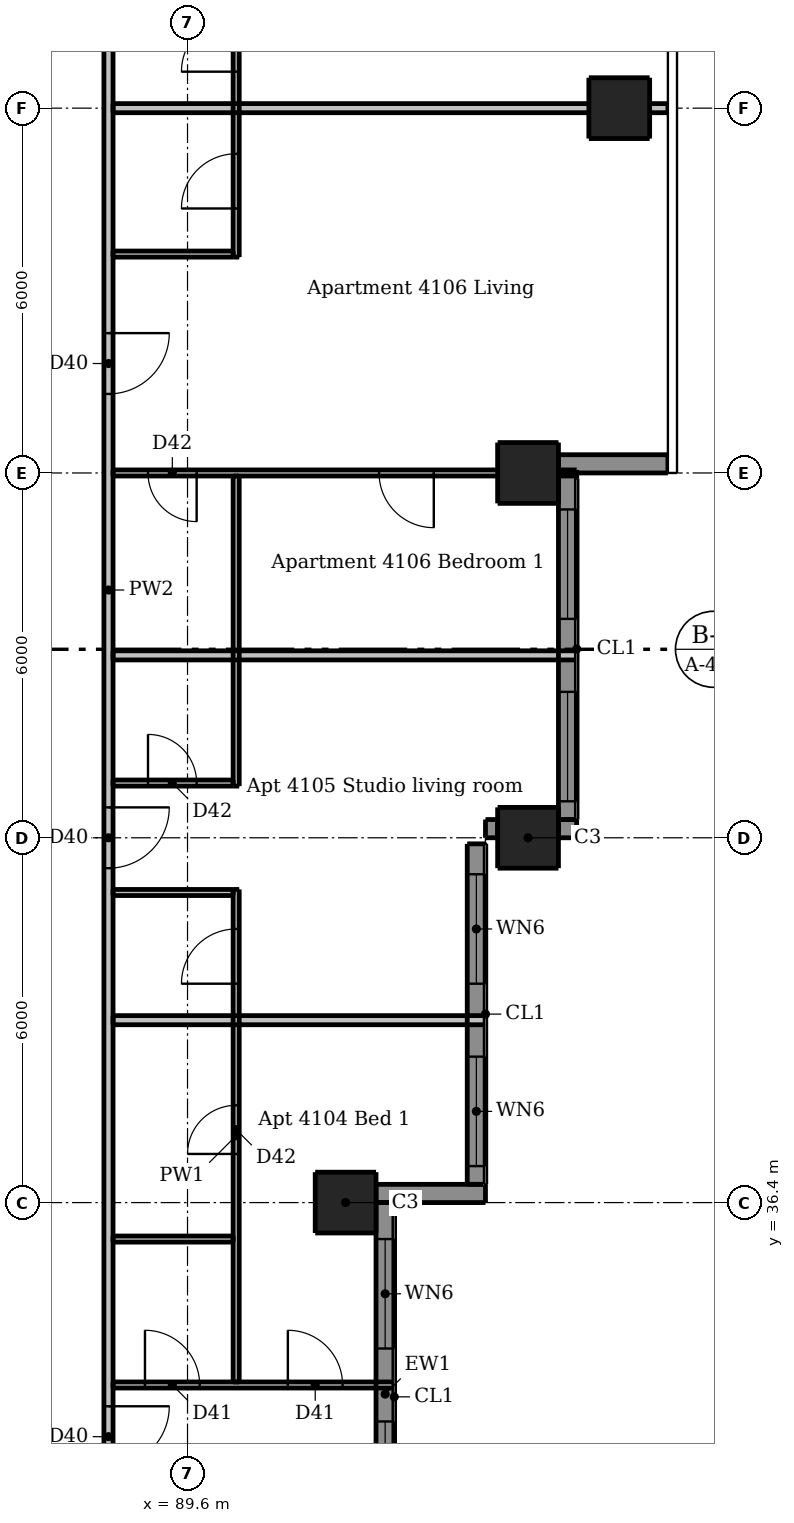
"""IFC4 building model, lengths in metres.
Left out: names, types, materials, properties, quantities, classifications, styles, units other than length and angle.
Written with IfcOpenShell. Run it as: python <this file> out.ifc"""

import sys

from ifc_helpers import new_model, si_unit, direction, frame, frame_2d, origin, origin_2d, place, context, subcontext, project, spatial, rectangle, extrude, element, fill, save


model = new_model("IFC4")
c1 = context("Model", 3, precision=1e-05, world=origin(), true_north=direction((0.0, 1.0)))
c2 = subcontext(c1, "Body", "Model", "MODEL_VIEW")
j1 = project(units=[si_unit("LENGTHUNIT", "METRE"), si_unit("PLANEANGLEUNIT", "RADIAN")], contexts=[c1])
p1 = place(None, origin())
s1 = spatial("IfcSite", under=j1, at=p1, CompositionType="ELEMENT")
p2 = place(p1, origin())
s2 = spatial("IfcBuilding", under=s1, at=p2, CompositionType="ELEMENT")
p3 = place(p2, frame((0.0, 0.0, 154.9)))
s3 = spatial("IfcBuildingStorey", under=s2, at=p3, CompositionType="ELEMENT", Elevation=154.9)
for number, where, z_axis, x_axis in (
    (1, (92.2, 36.4, 0.0), (0.0, 0.0, 1.0), (1.0, 0.0, 0.0)),
    (2, (95.2, 42.4, 0.0), (0.0, 0.0, 1.0), (1.0, 0.0, 0.0)),
    (3, (95.2, 48.4, 0.0), (0.0, 0.0, 1.0), (1.0, 0.0, 0.0)),
    (4, (96.7, 54.4, 0.0), (0.0, 0.0, 1.0), (1.0, 0.0, 0.0)),
):
    element("IfcColumn", number, at=place(p3, frame(where, z_axis=z_axis, x_axis=x_axis)), inside=s3, PredefinedType="COLUMN", context=c2, shape_type="SweptSolid", body=[
        extrude(rectangle(XDim=1.0, YDim=1.0, at=origin_2d()), origin(), (0.0, 0.0, 1.0), 3.05),
    ])
p4 = place(p3, frame((92.7, 36.55, 0.0), z_axis=(0.0, 0.0, 1.0), x_axis=(1.0, 0.0, 0.0)))
e5 = element("IfcWall", 5, at=p4, inside=s3, PredefinedType="SOLIDWALL", context=c2, shape_type="SweptSolid", body=[
    extrude(rectangle(XDim=1.8, YDim=0.3, at=frame_2d((0.9, 0.0))), origin(), (0.0, 0.0, 1.0), 3.05),
])
p5 = place(p3, frame((94.5, 42.55, 0.0), z_axis=(0.0, 0.0, 1.0), x_axis=(1.0, 0.0, 0.0)))
e6 = element("IfcWall", 6, at=p5, inside=s3, PredefinedType="SOLIDWALL", context=c2, shape_type="SweptSolid", body=[
    extrude(rectangle(XDim=0.2, YDim=0.3, at=frame_2d((0.1, 0.0))), origin(), (0.0, 0.0, 1.0), 3.05),
])
p6 = place(p3, frame((95.7, 42.55, 0.0), z_axis=(0.0, 0.0, 1.0), x_axis=(1.0, 0.0, 0.0)))
e7 = element("IfcWall", 7, at=p6, inside=s3, PredefinedType="SOLIDWALL", context=c2, shape_type="SweptSolid", body=[
    extrude(rectangle(XDim=0.3, YDim=0.3, at=frame_2d((0.15, 0.0))), origin(), (0.0, 0.0, 1.0), 3.05),
])
p7 = place(p3, frame((95.7, 48.55, 0.0), z_axis=(0.0, 0.0, 1.0), x_axis=(1.0, 0.0, 0.0)))
e8 = element("IfcWall", 8, at=p7, inside=s3, PredefinedType="SOLIDWALL", context=c2, shape_type="SweptSolid", body=[
    extrude(rectangle(XDim=1.8, YDim=0.3, at=frame_2d((0.9, 0.0))), origin(), (0.0, 0.0, 1.0), 3.05),
])
p8 = place(p3, frame((92.85, 30.1, 0.0), z_axis=(0.0, 0.0, 1.0), x_axis=(0.0, 1.0, 0.0)))
e9 = element("IfcWall", 9, at=p8, inside=s3, PredefinedType="SOLIDWALL", context=c2, shape_type="SweptSolid", body=[
    extrude(rectangle(XDim=6.3, YDim=0.3, at=frame_2d((3.15, 0.0))), origin(), (0.0, 0.0, 1.0), 3.05),
])
p9 = place(p8, frame((0.9, 0.0, 0.15)))
e10 = element("IfcOpeningElement", 10, at=p9, cuts=e9, PredefinedType="OPENING", context=c2, shape_type="SweptSolid", body=[
    extrude(rectangle(XDim=1.8, YDim=2.1, at=frame_2d((0.9, 1.05))), frame((0.0, 0.16, 0.0), z_axis=(0.0, -1.0, 0.0), x_axis=(1.0, 0.0, 0.0)), (0.0, 0.0, 1.0), 0.32),
])
p10 = place(p8, frame((3.9, 0.0, 0.15)))
e11 = element("IfcOpeningElement", 11, at=p10, cuts=e9, PredefinedType="OPENING", context=c2, shape_type="SweptSolid", body=[
    extrude(rectangle(XDim=1.8, YDim=2.1, at=frame_2d((0.9, 1.05))), frame((0.0, 0.16, 0.0), z_axis=(0.0, -1.0, 0.0), x_axis=(1.0, 0.0, 0.0)), (0.0, 0.0, 1.0), 0.32),
])
p11 = place(p3, frame((94.35, 36.7, 0.0), z_axis=(0.0, 0.0, 1.0), x_axis=(0.0, 1.0, 0.0)))
e12 = element("IfcWall", 12, at=p11, inside=s3, PredefinedType="SOLIDWALL", context=c2, shape_type="SweptSolid", body=[
    extrude(rectangle(XDim=5.6, YDim=0.3, at=frame_2d((2.8, 0.0))), origin(), (0.0, 0.0, 1.0), 3.05),
])
p12 = place(p11, frame((0.3, 0.0, 0.15)))
e13 = element("IfcOpeningElement", 13, at=p12, cuts=e12, PredefinedType="OPENING", context=c2, shape_type="SweptSolid", body=[
    extrude(rectangle(XDim=1.8, YDim=2.1, at=frame_2d((0.9, 1.05))), frame((0.0, 0.16, 0.0), z_axis=(0.0, -1.0, 0.0), x_axis=(1.0, 0.0, 0.0)), (0.0, 0.0, 1.0), 0.32),
])
p13 = place(p11, frame((3.3, 0.0, 0.15)))
e14 = element("IfcOpeningElement", 14, at=p13, cuts=e12, PredefinedType="OPENING", context=c2, shape_type="SweptSolid", body=[
    extrude(rectangle(XDim=1.8, YDim=2.1, at=frame_2d((0.9, 1.05))), frame((0.0, 0.16, 0.0), z_axis=(0.0, -1.0, 0.0), x_axis=(1.0, 0.0, 0.0)), (0.0, 0.0, 1.0), 0.32),
])
p14 = place(p3, frame((95.85, 42.7, 0.0), z_axis=(0.0, 0.0, 1.0), x_axis=(0.0, 1.0, 0.0)))
e15 = element("IfcWall", 15, at=p14, inside=s3, PredefinedType="SOLIDWALL", context=c2, shape_type="SweptSolid", body=[
    extrude(rectangle(XDim=5.7, YDim=0.3, at=frame_2d((2.85, 0.0))), origin(), (0.0, 0.0, 1.0), 3.05),
])
p15 = place(p14, frame((0.3, 0.0, 0.15)))
e16 = element("IfcOpeningElement", 16, at=p15, cuts=e15, PredefinedType="OPENING", context=c2, shape_type="SweptSolid", body=[
    extrude(rectangle(XDim=1.8, YDim=2.1, at=frame_2d((0.9, 1.05))), frame((0.0, 0.16, 0.0), z_axis=(0.0, -1.0, 0.0), x_axis=(1.0, 0.0, 0.0)), (0.0, 0.0, 1.0), 0.32),
])
p16 = place(p14, frame((3.3, 0.0, 0.15)))
e17 = element("IfcOpeningElement", 17, at=p16, cuts=e15, PredefinedType="OPENING", context=c2, shape_type="SweptSolid", body=[
    extrude(rectangle(XDim=1.8, YDim=2.1, at=frame_2d((0.9, 1.05))), frame((0.0, 0.16, 0.0), z_axis=(0.0, -1.0, 0.0), x_axis=(1.0, 0.0, 0.0)), (0.0, 0.0, 1.0), 0.32),
])
p17 = place(p3, frame((90.4, 33.45, 0.0), z_axis=(0.0, 0.0, 1.0), x_axis=(0.0, 1.0, 0.0)))
e18 = element("IfcWall", 18, at=p17, inside=s3, PredefinedType="PARTITIONING", context=c2, shape_type="SweptSolid", body=[
    extrude(rectangle(XDim=8.1, YDim=0.1, at=frame_2d((4.05, 0.0))), origin(), (0.0, 0.0, 1.0), 3.05),
])
p18 = place(p17, frame((3.75, 0.0, 0.0)))
e19 = element("IfcOpeningElement", 19, at=p18, cuts=e18, PredefinedType="OPENING", context=c2, shape_type="SweptSolid", body=[
    extrude(rectangle(XDim=0.8, YDim=2.1, at=frame_2d((0.4, 1.05))), frame((0.0, 0.06, 0.0), z_axis=(0.0, -1.0, 0.0), x_axis=(1.0, 0.0, 0.0)), (0.0, 0.0, 1.0), 0.12),
])
p19 = place(p17, frame((6.55, 0.0, 0.0)))
e20 = element("IfcOpeningElement", 20, at=p19, cuts=e18, PredefinedType="OPENING", context=c2, shape_type="SweptSolid", body=[
    extrude(rectangle(XDim=0.9, YDim=2.1, at=frame_2d((0.45, 1.05))), frame((0.0, 0.06, 0.0), z_axis=(0.0, -1.0, 0.0), x_axis=(1.0, 0.0, 0.0)), (0.0, 0.0, 1.0), 0.12),
])
p20 = place(p3, frame((90.4, 43.25, 0.0), z_axis=(0.0, 0.0, 1.0), x_axis=(0.0, 1.0, 0.0)))
e21 = element("IfcWall", 21, at=p20, inside=s3, PredefinedType="PARTITIONING", context=c2, shape_type="SweptSolid", body=[
    extrude(rectangle(XDim=5.1, YDim=0.1, at=frame_2d((2.55, 0.0))), origin(), (0.0, 0.0, 1.0), 3.05),
])
p21 = place(p3, frame((90.4, 51.95, 0.0), z_axis=(0.0, 0.0, 1.0), x_axis=(0.0, 1.0, 0.0)))
e22 = element("IfcWall", 22, at=p21, inside=s3, PredefinedType="PARTITIONING", context=c2, shape_type="SweptSolid", body=[
    extrude(rectangle(XDim=4.6, YDim=0.1, at=frame_2d((2.3, 0.0))), origin(), (0.0, 0.0, 1.0), 3.05),
])
p22 = place(p21, frame((0.8, 0.0, 0.0)))
e23 = element("IfcOpeningElement", 23, at=p22, cuts=e22, PredefinedType="OPENING", context=c2, shape_type="SweptSolid", body=[
    extrude(rectangle(XDim=0.9, YDim=2.1, at=frame_2d((0.45, 1.05))), frame((0.0, 0.06, 0.0), z_axis=(0.0, -1.0, 0.0), x_axis=(1.0, 0.0, 0.0)), (0.0, 0.0, 1.0), 0.12),
])
p23 = place(p21, frame((3.05, 0.0, 0.0)))
e24 = element("IfcOpeningElement", 24, at=p23, cuts=e22, PredefinedType="OPENING", context=c2, shape_type="SweptSolid", body=[
    extrude(rectangle(XDim=0.9, YDim=2.1, at=frame_2d((0.45, 1.05))), frame((0.0, 0.06, 0.0), z_axis=(0.0, -1.0, 0.0), x_axis=(1.0, 0.0, 0.0)), (0.0, 0.0, 1.0), 0.12),
])
p24 = place(p3, frame((88.375, 52.0, 0.0), z_axis=(0.0, 0.0, 1.0), x_axis=(1.0, 0.0, 0.0)))
e25 = element("IfcWall", 25, at=p24, inside=s3, PredefinedType="PARTITIONING", context=c2, shape_type="SweptSolid", body=[
    extrude(rectangle(XDim=1.975, YDim=0.1, at=frame_2d((0.988, 0.0))), origin(), (0.0, 0.0, 1.0), 3.05),
])
p25 = place(p3, frame((96.0, 48.4, 0.0), z_axis=(0.0, 0.0, 1.0), x_axis=(-1.0, 0.0, 0.0)))
e26 = element("IfcWall", 26, at=p25, inside=s3, PredefinedType="PARTITIONING", context=c2, shape_type="SweptSolid", body=[
    extrude(rectangle(XDim=7.625, YDim=0.1, at=frame_2d((3.812, 0.0))), origin(), (0.0, 0.0, 1.0), 2.59),
])
p26 = place(p25, frame((2.35, 0.0, 0.0)))
e27 = element("IfcOpeningElement", 27, at=p26, cuts=e26, PredefinedType="OPENING", context=c2, shape_type="SweptSolid", body=[
    extrude(rectangle(XDim=0.9, YDim=2.1, at=frame_2d((0.45, 1.05))), frame((0.0, 0.06, 0.0), z_axis=(0.0, -1.0, 0.0), x_axis=(1.0, 0.0, 0.0)), (0.0, 0.0, 1.0), 0.12),
])
p27 = place(p25, frame((6.25, 0.0, 0.0)))
e28 = element("IfcOpeningElement", 28, at=p27, cuts=e26, PredefinedType="OPENING", context=c2, shape_type="SweptSolid", body=[
    extrude(rectangle(XDim=0.8, YDim=2.1, at=frame_2d((0.4, 1.05))), frame((0.0, 0.06, 0.0), z_axis=(0.0, -1.0, 0.0), x_axis=(1.0, 0.0, 0.0)), (0.0, 0.0, 1.0), 0.12),
])
p28 = place(p3, frame((88.375, 43.3, 0.0), z_axis=(0.0, 0.0, 1.0), x_axis=(1.0, 0.0, 0.0)))
e29 = element("IfcWall", 29, at=p28, inside=s3, PredefinedType="PARTITIONING", context=c2, shape_type="SweptSolid", body=[
    extrude(rectangle(XDim=1.975, YDim=0.1, at=frame_2d((0.988, 0.0))), origin(), (0.0, 0.0, 1.0), 3.05),
])
p29 = place(p28, frame((0.575, 0.0, 0.0)))
e30 = element("IfcOpeningElement", 30, at=p29, cuts=e29, PredefinedType="OPENING", context=c2, shape_type="SweptSolid", body=[
    extrude(rectangle(XDim=0.8, YDim=2.1, at=frame_2d((0.4, 1.05))), frame((0.0, 0.06, 0.0), z_axis=(0.0, -1.0, 0.0), x_axis=(1.0, 0.0, 0.0)), (0.0, 0.0, 1.0), 0.12),
])
for number, where, z_axis, x_axis in (
    (31, (88.375, 41.5, 0.0), (0.0, 0.0, 1.0), (1.0, 0.0, 0.0)),
    (32, (88.375, 35.8, 0.0), (0.0, 0.0, 1.0), (1.0, 0.0, 0.0)),
):
    element("IfcWall", number, at=place(p3, frame(where, z_axis=z_axis, x_axis=x_axis)), inside=s3, PredefinedType="PARTITIONING", context=c2, shape_type="SweptSolid", body=[
        extrude(rectangle(XDim=1.975, YDim=0.1, at=frame_2d((0.988, 0.0))), origin(), (0.0, 0.0, 1.0), 3.05),
    ])
p30 = place(p3, frame((88.375, 33.4, 0.0), z_axis=(0.0, 0.0, 1.0), x_axis=(1.0, 0.0, 0.0)))
e33 = element("IfcWall", 33, at=p30, inside=s3, PredefinedType="PARTITIONING", context=c2, shape_type="SweptSolid", body=[
    extrude(rectangle(XDim=4.625, YDim=0.1, at=frame_2d((2.312, 0.0))), origin(), (0.0, 0.0, 1.0), 3.05),
])
p31 = place(p30, frame((0.525, 0.0, 0.0)))
e34 = element("IfcOpeningElement", 34, at=p31, cuts=e33, PredefinedType="OPENING", context=c2, shape_type="SweptSolid", body=[
    extrude(rectangle(XDim=0.9, YDim=2.1, at=frame_2d((0.45, 1.05))), frame((0.0, 0.06, 0.0), z_axis=(0.0, -1.0, 0.0), x_axis=(1.0, 0.0, 0.0)), (0.0, 0.0, 1.0), 0.12),
])
p32 = place(p30, frame((2.875, 0.0, 0.0)))
e35 = element("IfcOpeningElement", 35, at=p32, cuts=e33, PredefinedType="OPENING", context=c2, shape_type="SweptSolid", body=[
    extrude(rectangle(XDim=0.9, YDim=2.1, at=frame_2d((0.45, 1.05))), frame((0.0, 0.06, 0.0), z_axis=(0.0, -1.0, 0.0), x_axis=(1.0, 0.0, 0.0)), (0.0, 0.0, 1.0), 0.12),
])
p33 = place(p3, frame((88.3, 61.175, 0.0), z_axis=(0.0, 0.0, 1.0), x_axis=(0.0, -1.0, 0.0)))
e36 = element("IfcWall", 36, at=p33, inside=s3, PredefinedType="PARTITIONING", context=c2, shape_type="SweptSolid", body=[
    extrude(rectangle(XDim=29.4, YDim=0.15, at=frame_2d((14.7, 0.0))), origin(), (0.0, 0.0, 1.0), 3.05),
])
p34 = place(p33, frame((28.125, 0.0, 0.0)))
e37 = element("IfcOpeningElement", 37, at=p34, cuts=e36, PredefinedType="OPENING", context=c2, shape_type="SweptSolid", body=[
    extrude(rectangle(XDim=1.0, YDim=2.1, at=frame_2d((0.5, 1.05))), frame((0.0, 0.085, 0.0), z_axis=(0.0, -1.0, 0.0), x_axis=(1.0, 0.0, 0.0)), (0.0, 0.0, 1.0), 0.17),
])
p35 = place(p33, frame((18.275, 0.0, 0.0)))
e38 = element("IfcOpeningElement", 38, at=p35, cuts=e36, PredefinedType="OPENING", context=c2, shape_type="SweptSolid", body=[
    extrude(rectangle(XDim=1.0, YDim=2.1, at=frame_2d((0.5, 1.05))), frame((0.0, 0.085, 0.0), z_axis=(0.0, -1.0, 0.0), x_axis=(1.0, 0.0, 0.0)), (0.0, 0.0, 1.0), 0.17),
])
p36 = place(p33, frame((10.475, 0.0, 0.0)))
e39 = element("IfcOpeningElement", 39, at=p36, cuts=e36, PredefinedType="OPENING", context=c2, shape_type="SweptSolid", body=[
    extrude(rectangle(XDim=1.0, YDim=2.1, at=frame_2d((0.5, 1.05))), frame((0.0, 0.085, 0.0), z_axis=(0.0, -1.0, 0.0), x_axis=(1.0, 0.0, 0.0)), (0.0, 0.0, 1.0), 0.17),
])
p37 = place(p33, frame((3.275, 0.0, 0.0)))
e40 = element("IfcOpeningElement", 40, at=p37, cuts=e36, PredefinedType="OPENING", context=c2, shape_type="SweptSolid", body=[
    extrude(rectangle(XDim=1.0, YDim=2.1, at=frame_2d((0.5, 1.05))), frame((0.0, 0.085, 0.0), z_axis=(0.0, -1.0, 0.0), x_axis=(1.0, 0.0, 0.0)), (0.0, 0.0, 1.0), 0.17),
])
p38 = place(p3, frame((88.375, 54.4, 0.0), z_axis=(0.0, 0.0, 1.0), x_axis=(1.0, 0.0, 0.0)))
e41 = element("IfcWall", 41, at=p38, inside=s3, PredefinedType="PARTITIONING", context=c2, shape_type="SweptSolid", body=[
    extrude(rectangle(XDim=9.125, YDim=0.15, at=frame_2d((4.562, 0.0))), origin(), (0.0, 0.0, 1.0), 2.516),
])
p39 = place(p3, frame((88.375, 45.4, 0.0), z_axis=(0.0, 0.0, 1.0), x_axis=(1.0, 0.0, 0.0)))
e42 = element("IfcWall", 42, at=p39, inside=s3, PredefinedType="PARTITIONING", context=c2, shape_type="SweptSolid", body=[
    extrude(rectangle(XDim=7.625, YDim=0.15, at=frame_2d((3.812, 0.0))), origin(), (0.0, 0.0, 1.0), 3.05),
])
p40 = place(p3, frame((88.375, 39.4, 0.0), z_axis=(0.0, 0.0, 1.0), x_axis=(1.0, 0.0, 0.0)))
e43 = element("IfcWall", 43, at=p40, inside=s3, PredefinedType="PARTITIONING", context=c2, shape_type="SweptSolid", body=[
    extrude(rectangle(XDim=6.125, YDim=0.15, at=frame_2d((3.062, 0.0))), origin(), (0.0, 0.0, 1.0), 3.05),
])
p41 = place(p9, origin())
e44 = element("IfcWindow", 44, at=p41, inside=s3, PartitioningType="DOUBLE_PANEL_VERTICAL", PredefinedType="WINDOW", context=c2, shape_type="SweptSolid", body=[
    extrude(rectangle(XDim=1.8, YDim=2.1, at=frame_2d((0.9, 1.05))), frame((0.0, 0.03, 0.0), z_axis=(0.0, -1.0, 0.0), x_axis=(1.0, 0.0, 0.0)), (0.0, 0.0, 1.0), 0.06),
])
fill(e10, e44)
p42 = place(p10, origin())
e45 = element("IfcWindow", 45, at=p42, inside=s3, PartitioningType="DOUBLE_PANEL_VERTICAL", PredefinedType="WINDOW", context=c2, shape_type="SweptSolid", body=[
    extrude(rectangle(XDim=1.8, YDim=2.1, at=frame_2d((0.9, 1.05))), frame((0.0, 0.03, 0.0), z_axis=(0.0, -1.0, 0.0), x_axis=(1.0, 0.0, 0.0)), (0.0, 0.0, 1.0), 0.06),
])
fill(e11, e45)
p43 = place(p12, origin())
e46 = element("IfcWindow", 46, at=p43, inside=s3, PartitioningType="DOUBLE_PANEL_VERTICAL", PredefinedType="WINDOW", context=c2, shape_type="SweptSolid", body=[
    extrude(rectangle(XDim=1.8, YDim=2.1, at=frame_2d((0.9, 1.05))), frame((0.0, 0.03, 0.0), z_axis=(0.0, -1.0, 0.0), x_axis=(1.0, 0.0, 0.0)), (0.0, 0.0, 1.0), 0.06),
])
fill(e13, e46)
p44 = place(p13, origin())
e47 = element("IfcWindow", 47, at=p44, inside=s3, PartitioningType="DOUBLE_PANEL_VERTICAL", PredefinedType="WINDOW", context=c2, shape_type="SweptSolid", body=[
    extrude(rectangle(XDim=1.8, YDim=2.1, at=frame_2d((0.9, 1.05))), frame((0.0, 0.03, 0.0), z_axis=(0.0, -1.0, 0.0), x_axis=(1.0, 0.0, 0.0)), (0.0, 0.0, 1.0), 0.06),
])
fill(e14, e47)
p45 = place(p15, origin())
e48 = element("IfcWindow", 48, at=p45, inside=s3, PartitioningType="DOUBLE_PANEL_VERTICAL", PredefinedType="WINDOW", context=c2, shape_type="SweptSolid", body=[
    extrude(rectangle(XDim=1.8, YDim=2.1, at=frame_2d((0.9, 1.05))), frame((0.0, 0.03, 0.0), z_axis=(0.0, -1.0, 0.0), x_axis=(1.0, 0.0, 0.0)), (0.0, 0.0, 1.0), 0.06),
])
fill(e16, e48)
p46 = place(p16, origin())
e49 = element("IfcWindow", 49, at=p46, inside=s3, PartitioningType="DOUBLE_PANEL_VERTICAL", PredefinedType="WINDOW", context=c2, shape_type="SweptSolid", body=[
    extrude(rectangle(XDim=1.8, YDim=2.1, at=frame_2d((0.9, 1.05))), frame((0.0, 0.03, 0.0), z_axis=(0.0, -1.0, 0.0), x_axis=(1.0, 0.0, 0.0)), (0.0, 0.0, 1.0), 0.06),
])
fill(e17, e49)
p47 = place(p34, origin())
e50 = element("IfcDoor", 50, at=p47, inside=s3, OperationType="SINGLE_SWING_LEFT", PredefinedType="DOOR", context=c2, shape_type="SweptSolid", body=[
    extrude(rectangle(XDim=1.0, YDim=2.1, at=frame_2d((0.5, 1.05))), frame((0.0, 0.025, 0.0), z_axis=(0.0, -1.0, 0.0), x_axis=(1.0, 0.0, 0.0)), (0.0, 0.0, 1.0), 0.05),
])
fill(e37, e50)
p48 = place(p31, origin())
e51 = element("IfcDoor", 51, at=p48, inside=s3, OperationType="SINGLE_SWING_LEFT", PredefinedType="DOOR", context=c2, shape_type="SweptSolid", body=[
    extrude(rectangle(XDim=0.9, YDim=2.1, at=frame_2d((0.45, 1.05))), frame((0.0, 0.025, 0.0), z_axis=(0.0, -1.0, 0.0), x_axis=(1.0, 0.0, 0.0)), (0.0, 0.0, 1.0), 0.05),
])
fill(e34, e51)
p49 = place(p32, origin())
e52 = element("IfcDoor", 52, at=p49, inside=s3, OperationType="SINGLE_SWING_LEFT", PredefinedType="DOOR", context=c2, shape_type="SweptSolid", body=[
    extrude(rectangle(XDim=0.9, YDim=2.1, at=frame_2d((0.45, 1.05))), frame((0.0, 0.025, 0.0), z_axis=(0.0, -1.0, 0.0), x_axis=(1.0, 0.0, 0.0)), (0.0, 0.0, 1.0), 0.05),
])
fill(e35, e52)
p50 = place(p18, origin())
e53 = element("IfcDoor", 53, at=p50, inside=s3, OperationType="SINGLE_SWING_LEFT", PredefinedType="DOOR", context=c2, shape_type="SweptSolid", body=[
    extrude(rectangle(XDim=0.8, YDim=2.1, at=frame_2d((0.4, 1.05))), frame((0.0, 0.025, 0.0), z_axis=(0.0, -1.0, 0.0), x_axis=(1.0, 0.0, 0.0)), (0.0, 0.0, 1.0), 0.05),
])
fill(e19, e53)
p51 = place(p35, origin())
e54 = element("IfcDoor", 54, at=p51, inside=s3, OperationType="SINGLE_SWING_LEFT", PredefinedType="DOOR", context=c2, shape_type="SweptSolid", body=[
    extrude(rectangle(XDim=1.0, YDim=2.1, at=frame_2d((0.5, 1.05))), frame((0.0, 0.025, 0.0), z_axis=(0.0, -1.0, 0.0), x_axis=(1.0, 0.0, 0.0)), (0.0, 0.0, 1.0), 0.05),
])
fill(e38, e54)
p52 = place(p19, origin())
e55 = element("IfcDoor", 55, at=p52, inside=s3, OperationType="SINGLE_SWING_LEFT", PredefinedType="DOOR", context=c2, shape_type="SweptSolid", body=[
    extrude(rectangle(XDim=0.9, YDim=2.1, at=frame_2d((0.45, 1.05))), frame((0.0, 0.025, 0.0), z_axis=(0.0, -1.0, 0.0), x_axis=(1.0, 0.0, 0.0)), (0.0, 0.0, 1.0), 0.05),
])
fill(e20, e55)
p53 = place(p29, origin())
e56 = element("IfcDoor", 56, at=p53, inside=s3, OperationType="SINGLE_SWING_LEFT", PredefinedType="DOOR", context=c2, shape_type="SweptSolid", body=[
    extrude(rectangle(XDim=0.8, YDim=2.1, at=frame_2d((0.4, 1.05))), frame((0.0, 0.025, 0.0), z_axis=(0.0, -1.0, 0.0), x_axis=(1.0, 0.0, 0.0)), (0.0, 0.0, 1.0), 0.05),
])
fill(e30, e56)
p54 = place(p36, origin())
e57 = element("IfcDoor", 57, at=p54, inside=s3, OperationType="SINGLE_SWING_LEFT", PredefinedType="DOOR", context=c2, shape_type="SweptSolid", body=[
    extrude(rectangle(XDim=1.0, YDim=2.1, at=frame_2d((0.5, 1.05))), frame((0.0, 0.025, 0.0), z_axis=(0.0, -1.0, 0.0), x_axis=(1.0, 0.0, 0.0)), (0.0, 0.0, 1.0), 0.05),
])
fill(e39, e57)
p55 = place(p22, origin())
e58 = element("IfcDoor", 58, at=p55, inside=s3, OperationType="SINGLE_SWING_LEFT", PredefinedType="DOOR", context=c2, shape_type="SweptSolid", body=[
    extrude(rectangle(XDim=0.9, YDim=2.1, at=frame_2d((0.45, 1.05))), frame((0.0, 0.025, 0.0), z_axis=(0.0, -1.0, 0.0), x_axis=(1.0, 0.0, 0.0)), (0.0, 0.0, 1.0), 0.05),
])
fill(e23, e58)
p56 = place(p26, origin())
e59 = element("IfcDoor", 59, at=p56, inside=s3, OperationType="SINGLE_SWING_LEFT", PredefinedType="DOOR", context=c2, shape_type="SweptSolid", body=[
    extrude(rectangle(XDim=0.9, YDim=2.1, at=frame_2d((0.45, 1.05))), frame((0.0, 0.025, 0.0), z_axis=(0.0, -1.0, 0.0), x_axis=(1.0, 0.0, 0.0)), (0.0, 0.0, 1.0), 0.05),
])
fill(e27, e59)
p57 = place(p27, origin())
e60 = element("IfcDoor", 60, at=p57, inside=s3, OperationType="SINGLE_SWING_LEFT", PredefinedType="DOOR", context=c2, shape_type="SweptSolid", body=[
    extrude(rectangle(XDim=0.8, YDim=2.1, at=frame_2d((0.4, 1.05))), frame((0.0, 0.025, 0.0), z_axis=(0.0, -1.0, 0.0), x_axis=(1.0, 0.0, 0.0)), (0.0, 0.0, 1.0), 0.05),
])
fill(e28, e60)
p58 = place(p23, origin())
e61 = element("IfcDoor", 61, at=p58, inside=s3, OperationType="SINGLE_SWING_LEFT", PredefinedType="DOOR", context=c2, shape_type="SweptSolid", body=[
    extrude(rectangle(XDim=0.9, YDim=2.1, at=frame_2d((0.45, 1.05))), frame((0.0, 0.025, 0.0), z_axis=(0.0, -1.0, 0.0), x_axis=(1.0, 0.0, 0.0)), (0.0, 0.0, 1.0), 0.05),
])
fill(e24, e61)
save(model, sys.argv[1])
